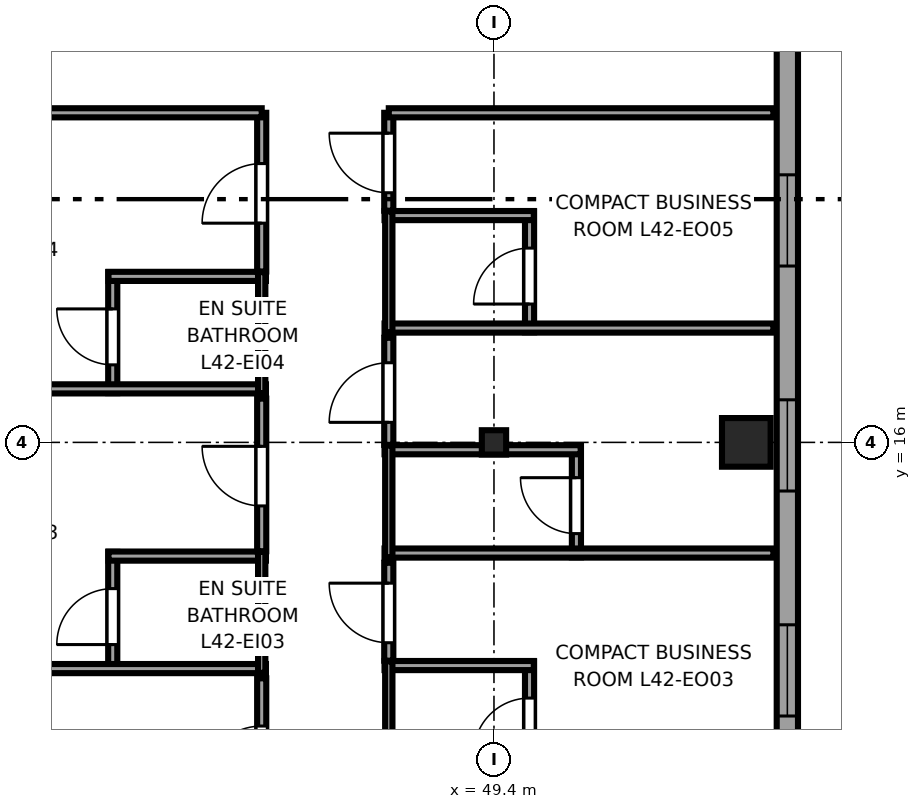
"""IFC4 building model, lengths in metres.
Left out: names, types, materials, properties, quantities, classifications, styles, units other than length and angle.
Written with IfcOpenShell. Run it as: python <this file> out.ifc"""

import sys

from ifc_helpers import new_model, si_unit, direction, frame, frame_2d, origin, origin_2d, place, context, subcontext, project, spatial, rectangle, i_section, extrude, source, transform, mapped, element, fill, save


model = new_model("IFC4")
c1 = context("Model", 3, precision=1e-05, world=origin(), true_north=direction((0.0, 1.0)))
c2 = subcontext(c1, "Body", "Model", "MODEL_VIEW")
j1 = project(units=[si_unit("LENGTHUNIT", "METRE"), si_unit("PLANEANGLEUNIT", "RADIAN")], contexts=[c1])
p1 = place(None, origin())
s1 = spatial("IfcSite", under=j1, at=p1, CompositionType="ELEMENT")
p2 = place(p1, origin())
s2 = spatial("IfcBuilding", under=s1, at=p2, CompositionType="ELEMENT")
p3 = place(p2, frame((0.0, 0.0, 161.25)))
s3 = spatial("IfcBuildingStorey", under=s2, at=p3, CompositionType="ELEMENT", Elevation=161.25)
m1 = source(origin(), c2, "Body", "SweptSolid", [
    extrude(i_section(OverallWidth=0.4, OverallDepth=0.4, WebThickness=0.02, FlangeThickness=0.035, at=origin_2d()), origin(), (0.0, 0.0, 1.0), 3.55),
])
p4 = place(p3, frame((49.4, 16.0, 0.0), z_axis=(0.0, 0.0, 1.0), x_axis=(1.0, 0.0, 0.0)))
e1 = element("IfcColumn", 1, at=p4, inside=s3, PredefinedType="COLUMN", context=c2, shape_type="MappedRepresentation", body=[
    mapped(m1, transform((0.0, 0.0, 0.0), x_axis=(1.0, 0.0, 0.0), y_axis=(0.0, 1.0, 0.0), z_axis=(0.0, 0.0, 1.0), scale=1.0)),
])
m2 = source(origin(), c2, "Body", "SweptSolid", [
    extrude(rectangle(XDim=0.8, YDim=0.8, at=origin_2d()), origin(), (0.0, 0.0, 1.0), 3.55),
])
p5 = place(p3, frame((53.55, 16.0, 0.0), z_axis=(0.0, 0.0, 1.0), x_axis=(1.0, 0.0, 0.0)))
e2 = element("IfcColumn", 2, at=p5, inside=s3, PredefinedType="COLUMN", context=c2, shape_type="MappedRepresentation", body=[
    mapped(m2, transform((0.0, 0.0, 0.0), x_axis=(1.0, 0.0, 0.0), y_axis=(0.0, 1.0, 0.0), z_axis=(0.0, 0.0, 1.0), scale=1.0)),
])
p6 = place(p3, frame((54.225, 7.017, 0.0), z_axis=(0.0, 0.0, 1.0), x_axis=(0.0, 1.0, 0.0)))
e3 = element("IfcWall", 3, at=p6, inside=s3, PredefinedType="SOLIDWALL", context=c2, shape_type="SweptSolid", body=[
    extrude(rectangle(XDim=34.566, YDim=0.35, at=frame_2d((17.283, 0.0))), origin(), (0.0, 0.0, 1.0), 3.37),
])
p7 = place(p6, frame((18.093, 0.0, 0.68)))
e4 = element("IfcOpeningElement", 4, at=p7, cuts=e3, PredefinedType="OPENING", context=c2, shape_type="SweptSolid", body=[
    extrude(rectangle(XDim=2.55, YDim=1.92, at=frame_2d((1.275, 0.96))), frame((0.0, 0.185, 0.0), z_axis=(0.0, -1.0, 0.0), x_axis=(1.0, 0.0, 0.0)), (0.0, 0.0, 1.0), 0.37),
])
p8 = place(p6, frame((0.986, 0.0, 0.62)))
e5 = element("IfcOpeningElement", 5, at=p8, cuts=e3, PredefinedType="OPENING", context=c2, shape_type="SweptSolid", body=[
    extrude(rectangle(XDim=1.5, YDim=1.55, at=frame_2d((0.75, 0.775))), frame((0.0, 0.185, 0.0), z_axis=(0.0, -1.0, 0.0), x_axis=(1.0, 0.0, 0.0)), (0.0, 0.0, 1.0), 0.37),
])
p9 = place(p6, frame((4.483, 0.0, 0.62)))
e6 = element("IfcOpeningElement", 6, at=p9, cuts=e3, PredefinedType="OPENING", context=c2, shape_type="SweptSolid", body=[
    extrude(rectangle(XDim=1.5, YDim=1.55, at=frame_2d((0.75, 0.775))), frame((0.0, 0.185, 0.0), z_axis=(0.0, -1.0, 0.0), x_axis=(1.0, 0.0, 0.0)), (0.0, 0.0, 1.0), 0.37),
])
p10 = place(p6, frame((8.183, 0.0, 0.62)))
e7 = element("IfcOpeningElement", 7, at=p10, cuts=e3, PredefinedType="OPENING", context=c2, shape_type="SweptSolid", body=[
    extrude(rectangle(XDim=1.5, YDim=1.55, at=frame_2d((0.75, 0.775))), frame((0.0, 0.185, 0.0), z_axis=(0.0, -1.0, 0.0), x_axis=(1.0, 0.0, 0.0)), (0.0, 0.0, 1.0), 0.37),
])
p11 = place(p6, frame((11.883, 0.0, 0.62)))
e8 = element("IfcOpeningElement", 8, at=p11, cuts=e3, PredefinedType="OPENING", context=c2, shape_type="SweptSolid", body=[
    extrude(rectangle(XDim=1.5, YDim=1.55, at=frame_2d((0.75, 0.775))), frame((0.0, 0.185, 0.0), z_axis=(0.0, -1.0, 0.0), x_axis=(1.0, 0.0, 0.0)), (0.0, 0.0, 1.0), 0.37),
])
p12 = place(p6, frame((27.768, 0.0, 0.62)))
e9 = element("IfcOpeningElement", 9, at=p12, cuts=e3, PredefinedType="OPENING", context=c2, shape_type="SweptSolid", body=[
    extrude(rectangle(XDim=1.5, YDim=1.55, at=frame_2d((0.75, 0.775))), frame((0.0, 0.185, 0.0), z_axis=(0.0, -1.0, 0.0), x_axis=(1.0, 0.0, 0.0)), (0.0, 0.0, 1.0), 0.37),
])
p13 = place(p3, frame((43.13, 12.21, 0.0), z_axis=(0.0, 0.0, 1.0), x_axis=(0.0, 1.0, 0.0)))
e10 = element("IfcWall", 10, at=p13, inside=s3, PredefinedType="PARTITIONING", context=c2, shape_type="SweptSolid", body=[
    extrude(rectangle(XDim=1.99, YDim=0.15, at=frame_2d((0.995, 0.0))), origin(), (0.0, 0.0, 1.0), 3.37),
])
p14 = place(p13, frame((0.465, 0.0, 0.0)))
e11 = element("IfcOpeningElement", 11, at=p14, cuts=e10, PredefinedType="OPENING", context=c2, shape_type="SweptSolid", body=[
    extrude(rectangle(XDim=0.92, YDim=2.01, at=frame_2d((0.46, 1.005))), frame((0.0, 0.085, 0.0), z_axis=(0.0, -1.0, 0.0), x_axis=(1.0, 0.0, 0.0)), (0.0, 0.0, 1.0), 0.17),
])
p15 = place(p3, frame((34.65, 12.28, 0.0), z_axis=(0.0, 0.0, 1.0), x_axis=(1.0, 0.0, 0.0)))
e12 = element("IfcWall", 12, at=p15, inside=s3, PredefinedType="PARTITIONING", context=c2, shape_type="SweptSolid", body=[
    extrude(rectangle(XDim=11.0, YDim=0.15, at=frame_2d((5.5, 0.0))), origin(), (0.0, 0.0, 1.0), 3.37),
])
p16 = place(p3, frame((43.06, 14.13, 0.0), z_axis=(0.0, 0.0, 1.0), x_axis=(1.0, 0.0, 0.0)))
e13 = element("IfcWall", 13, at=p16, inside=s3, PredefinedType="PARTITIONING", context=c2, shape_type="SweptSolid", body=[
    extrude(rectangle(XDim=2.59, YDim=0.15, at=frame_2d((1.295, 0.0))), origin(), (0.0, 0.0, 1.0), 3.37),
])
p17 = place(p3, frame((45.58, 12.21, 0.0), z_axis=(0.0, 0.0, 1.0), x_axis=(0.0, 1.0, 0.0)))
e14 = element("IfcWall", 14, at=p17, inside=s3, PredefinedType="PLUMBINGWALL", context=c2, shape_type="SweptSolid", body=[
    extrude(rectangle(XDim=1.99, YDim=0.12, at=frame_2d((0.995, 0.0))), origin(), (0.0, 0.0, 1.0), 3.001),
])
p18 = place(p3, frame((43.13, 16.81, 0.0), z_axis=(0.0, 0.0, 1.0), x_axis=(0.0, 1.0, 0.0)))
e15 = element("IfcWall", 15, at=p18, inside=s3, PredefinedType="PARTITIONING", context=c2, shape_type="SweptSolid", body=[
    extrude(rectangle(XDim=1.99, YDim=0.15, at=frame_2d((0.995, 0.0))), origin(), (0.0, 0.0, 1.0), 3.37),
])
p19 = place(p18, frame((0.465, 0.0, 0.0)))
e16 = element("IfcOpeningElement", 16, at=p19, cuts=e15, PredefinedType="OPENING", context=c2, shape_type="SweptSolid", body=[
    extrude(rectangle(XDim=0.92, YDim=2.01, at=frame_2d((0.46, 1.005))), frame((0.0, 0.085, 0.0), z_axis=(0.0, -1.0, 0.0), x_axis=(1.0, 0.0, 0.0)), (0.0, 0.0, 1.0), 0.17),
])
p20 = place(p3, frame((34.65, 16.88, 0.0), z_axis=(0.0, 0.0, 1.0), x_axis=(1.0, 0.0, 0.0)))
e17 = element("IfcWall", 17, at=p20, inside=s3, PredefinedType="PARTITIONING", context=c2, shape_type="SweptSolid", body=[
    extrude(rectangle(XDim=11.0, YDim=0.15, at=frame_2d((5.5, 0.0))), origin(), (0.0, 0.0, 1.0), 3.37),
])
p21 = place(p3, frame((43.06, 18.73, 0.0), z_axis=(0.0, 0.0, 1.0), x_axis=(1.0, 0.0, 0.0)))
e18 = element("IfcWall", 18, at=p21, inside=s3, PredefinedType="PARTITIONING", context=c2, shape_type="SweptSolid", body=[
    extrude(rectangle(XDim=2.59, YDim=0.15, at=frame_2d((1.295, 0.0))), origin(), (0.0, 0.0, 1.0), 3.37),
])
p22 = place(p3, frame((45.58, 16.81, 0.0), z_axis=(0.0, 0.0, 1.0), x_axis=(0.0, 1.0, 0.0)))
e19 = element("IfcWall", 19, at=p22, inside=s3, PredefinedType="PLUMBINGWALL", context=c2, shape_type="SweptSolid", body=[
    extrude(rectangle(XDim=1.99, YDim=0.12, at=frame_2d((0.995, 0.0))), origin(), (0.0, 0.0, 1.0), 3.001),
])
p23 = place(p3, frame((49.985, 10.41, 0.0), z_axis=(0.0, 0.0, 1.0), x_axis=(0.0, 1.0, 0.0)))
e20 = element("IfcWall", 20, at=p23, inside=s3, PredefinedType="PARTITIONING", context=c2, shape_type="SweptSolid", body=[
    extrude(rectangle(XDim=1.99, YDim=0.15, at=frame_2d((0.995, 0.0))), origin(), (0.0, 0.0, 1.0), 3.37),
])
p24 = place(p23, frame((0.465, 0.0, 0.0)))
e21 = element("IfcOpeningElement", 21, at=p24, cuts=e20, PredefinedType="OPENING", context=c2, shape_type="SweptSolid", body=[
    extrude(rectangle(XDim=0.92, YDim=2.01, at=frame_2d((0.46, 1.005))), frame((0.0, 0.085, 0.0), z_axis=(0.0, -1.0, 0.0), x_axis=(1.0, 0.0, 0.0)), (0.0, 0.0, 1.0), 0.17),
])
p25 = place(p3, frame((47.6, 12.33, 0.0), z_axis=(0.0, 0.0, 1.0), x_axis=(1.0, 0.0, 0.0)))
e22 = element("IfcWall", 22, at=p25, inside=s3, PredefinedType="PARTITIONING", context=c2, shape_type="SweptSolid", body=[
    extrude(rectangle(XDim=2.455, YDim=0.15, at=frame_2d((1.228, 0.0))), origin(), (0.0, 0.0, 1.0), 3.37),
])
p26 = place(p3, frame((47.67, 10.41, 0.0), z_axis=(0.0, 0.0, 1.0), x_axis=(0.0, 1.0, 0.0)))
e23 = element("IfcWall", 23, at=p26, inside=s3, PredefinedType="PLUMBINGWALL", context=c2, shape_type="SweptSolid", body=[
    extrude(rectangle(XDim=1.99, YDim=0.12, at=frame_2d((0.995, 0.0))), origin(), (0.0, 0.0, 1.0), 3.37),
])
p27 = place(p3, frame((50.756, 14.11, 0.0), z_axis=(0.0, 0.0, 1.0), x_axis=(0.0, 1.0, 0.0)))
e24 = element("IfcWall", 24, at=p27, inside=s3, PredefinedType="PARTITIONING", context=c2, shape_type="SweptSolid", body=[
    extrude(rectangle(XDim=1.839, YDim=0.15, at=frame_2d((0.919, 0.0))), origin(), (0.0, 0.0, 1.0), 3.37),
])
p28 = place(p27, frame((0.389, 0.0, 0.0)))
e25 = element("IfcOpeningElement", 25, at=p28, cuts=e24, PredefinedType="OPENING", context=c2, shape_type="SweptSolid", body=[
    extrude(rectangle(XDim=0.92, YDim=2.01, at=frame_2d((0.46, 1.005))), frame((0.0, 0.085, 0.0), z_axis=(0.0, -1.0, 0.0), x_axis=(1.0, 0.0, 0.0)), (0.0, 0.0, 1.0), 0.17),
])
p29 = place(p3, frame((47.6, 14.18, 0.0), z_axis=(0.0, 0.0, 1.0), x_axis=(1.0, 0.0, 0.0)))
e26 = element("IfcWall", 26, at=p29, inside=s3, PredefinedType="PARTITIONING", context=c2, shape_type="SweptSolid", body=[
    extrude(rectangle(XDim=6.395, YDim=0.15, at=frame_2d((3.198, 0.0))), origin(), (0.0, 0.0, 1.0), 3.37),
])
p30 = place(p3, frame((47.6, 15.879, 0.0), z_axis=(0.0, 0.0, 1.0), x_axis=(1.0, 0.0, 0.0)))
e27 = element("IfcWall", 27, at=p30, inside=s3, PredefinedType="PARTITIONING", context=c2, shape_type="SweptSolid", body=[
    extrude(rectangle(XDim=3.226, YDim=0.15, at=frame_2d((1.613, 0.0))), origin(), (0.0, 0.0, 1.0), 2.758),
])
p31 = place(p3, frame((47.67, 14.11, 0.0), z_axis=(0.0, 0.0, 1.0), x_axis=(0.0, 1.0, 0.0)))
e28 = element("IfcWall", 28, at=p31, inside=s3, PredefinedType="PLUMBINGWALL", context=c2, shape_type="SweptSolid", body=[
    extrude(rectangle(XDim=1.839, YDim=0.12, at=frame_2d((0.919, 0.0))), origin(), (0.0, 0.0, 1.0), 3.37),
])
p32 = place(p3, frame((49.985, 17.81, 0.0), z_axis=(0.0, 0.0, 1.0), x_axis=(0.0, 1.0, 0.0)))
e29 = element("IfcWall", 29, at=p32, inside=s3, PredefinedType="PARTITIONING", context=c2, shape_type="SweptSolid", body=[
    extrude(rectangle(XDim=1.99, YDim=0.15, at=frame_2d((0.995, 0.0))), origin(), (0.0, 0.0, 1.0), 3.37),
])
p33 = place(p32, frame((0.465, 0.0, 0.0)))
e30 = element("IfcOpeningElement", 30, at=p33, cuts=e29, PredefinedType="OPENING", context=c2, shape_type="SweptSolid", body=[
    extrude(rectangle(XDim=0.92, YDim=2.01, at=frame_2d((0.46, 1.005))), frame((0.0, 0.085, 0.0), z_axis=(0.0, -1.0, 0.0), x_axis=(1.0, 0.0, 0.0)), (0.0, 0.0, 1.0), 0.17),
])
p34 = place(p3, frame((47.6, 17.88, 0.0), z_axis=(0.0, 0.0, 1.0), x_axis=(1.0, 0.0, 0.0)))
e31 = element("IfcWall", 31, at=p34, inside=s3, PredefinedType="PARTITIONING", context=c2, shape_type="SweptSolid", body=[
    extrude(rectangle(XDim=6.395, YDim=0.15, at=frame_2d((3.198, 0.0))), origin(), (0.0, 0.0, 1.0), 3.37),
])
p35 = place(p3, frame((47.6, 19.73, 0.0), z_axis=(0.0, 0.0, 1.0), x_axis=(1.0, 0.0, 0.0)))
e32 = element("IfcWall", 32, at=p35, inside=s3, PredefinedType="PARTITIONING", context=c2, shape_type="SweptSolid", body=[
    extrude(rectangle(XDim=2.455, YDim=0.15, at=frame_2d((1.228, 0.0))), origin(), (0.0, 0.0, 1.0), 3.37),
])
p36 = place(p3, frame((47.67, 17.81, 0.0), z_axis=(0.0, 0.0, 1.0), x_axis=(0.0, 1.0, 0.0)))
e33 = element("IfcWall", 33, at=p36, inside=s3, PredefinedType="PLUMBINGWALL", context=c2, shape_type="SweptSolid", body=[
    extrude(rectangle(XDim=1.99, YDim=0.12, at=frame_2d((0.995, 0.0))), origin(), (0.0, 0.0, 1.0), 3.37),
])
p37 = place(p3, frame((45.58, 9.61, 0.0), z_axis=(0.0, 0.0, 1.0), x_axis=(0.0, 1.0, 0.0)))
e34 = element("IfcWall", 34, at=p37, inside=s3, PredefinedType="PARTITIONING", context=c2, shape_type="SweptSolid", body=[
    extrude(rectangle(XDim=2.51, YDim=0.15, at=frame_2d((1.255, 0.0))), origin(), (0.0, 0.0, 1.0), 3.001),
])
p38 = place(p37, frame((0.745, 0.0, 0.0)))
e35 = element("IfcOpeningElement", 35, at=p38, cuts=e34, PredefinedType="OPENING", context=c2, shape_type="SweptSolid", body=[
    extrude(rectangle(XDim=0.98, YDim=2.12, at=frame_2d((0.49, 1.06))), frame((0.0, 0.085, 0.0), z_axis=(0.0, -1.0, 0.0), x_axis=(1.0, 0.0, 0.0)), (0.0, 0.0, 1.0), 0.17),
])
p39 = place(p3, frame((45.58, 14.21, 0.0), z_axis=(0.0, 0.0, 1.0), x_axis=(0.0, 1.0, 0.0)))
e36 = element("IfcWall", 36, at=p39, inside=s3, PredefinedType="PARTITIONING", context=c2, shape_type="SweptSolid", body=[
    extrude(rectangle(XDim=2.51, YDim=0.15, at=frame_2d((1.255, 0.0))), origin(), (0.0, 0.0, 1.0), 3.001),
])
p40 = place(p39, frame((0.745, 0.0, 0.0)))
e37 = element("IfcOpeningElement", 37, at=p40, cuts=e36, PredefinedType="OPENING", context=c2, shape_type="SweptSolid", body=[
    extrude(rectangle(XDim=0.98, YDim=2.12, at=frame_2d((0.49, 1.06))), frame((0.0, 0.085, 0.0), z_axis=(0.0, -1.0, 0.0), x_axis=(1.0, 0.0, 0.0)), (0.0, 0.0, 1.0), 0.17),
])
p41 = place(p3, frame((45.58, 18.81, 0.0), z_axis=(0.0, 0.0, 1.0), x_axis=(0.0, 1.0, 0.0)))
e38 = element("IfcWall", 38, at=p41, inside=s3, PredefinedType="PARTITIONING", context=c2, shape_type="SweptSolid", body=[
    extrude(rectangle(XDim=2.61, YDim=0.15, at=frame_2d((1.305, 0.0))), origin(), (0.0, 0.0, 1.0), 3.001),
])
p42 = place(p41, frame((0.795, 0.0, 0.0)))
e39 = element("IfcOpeningElement", 39, at=p42, cuts=e38, PredefinedType="OPENING", context=c2, shape_type="SweptSolid", body=[
    extrude(rectangle(XDim=0.98, YDim=2.12, at=frame_2d((0.49, 1.06))), frame((0.0, 0.085, 0.0), z_axis=(0.0, -1.0, 0.0), x_axis=(1.0, 0.0, 0.0)), (0.0, 0.0, 1.0), 0.17),
])
p43 = place(p3, frame((34.65, 21.42, 0.0), z_axis=(0.0, 0.0, 1.0), x_axis=(1.0, 0.0, 0.0)))
e40 = element("IfcWall", 40, at=p43, inside=s3, PredefinedType="PARTITIONING", context=c2, shape_type="SweptSolid", body=[
    extrude(rectangle(XDim=10.93, YDim=0.15, at=frame_2d((5.465, 0.0))), origin(), (0.0, 0.0, 1.0), 3.37),
])
p44 = place(p3, frame((47.67, 12.41, 0.0), z_axis=(0.0, 0.0, 1.0), x_axis=(0.0, 1.0, 0.0)))
e41 = element("IfcWall", 41, at=p44, inside=s3, PredefinedType="PARTITIONING", context=c2, shape_type="SweptSolid", body=[
    extrude(rectangle(XDim=1.61, YDim=0.15, at=frame_2d((0.805, 0.0))), origin(), (0.0, 0.0, 1.0), 3.37),
])
p45 = place(p44, frame((0.295, 0.0, 0.0)))
e42 = element("IfcOpeningElement", 42, at=p45, cuts=e41, PredefinedType="OPENING", context=c2, shape_type="SweptSolid", body=[
    extrude(rectangle(XDim=0.98, YDim=2.12, at=frame_2d((0.49, 1.06))), frame((0.0, 0.085, 0.0), z_axis=(0.0, -1.0, 0.0), x_axis=(1.0, 0.0, 0.0)), (0.0, 0.0, 1.0), 0.17),
])
p46 = place(p3, frame((47.67, 15.959, 0.0), z_axis=(0.0, 0.0, 1.0), x_axis=(0.0, 1.0, 0.0)))
e43 = element("IfcWall", 43, at=p46, inside=s3, PredefinedType="PARTITIONING", context=c2, shape_type="SweptSolid", body=[
    extrude(rectangle(XDim=1.761, YDim=0.15, at=frame_2d((0.88, 0.0))), origin(), (0.0, 0.0, 1.0), 3.37),
])
p47 = place(p46, frame((0.371, 0.0, 0.0)))
e44 = element("IfcOpeningElement", 44, at=p47, cuts=e43, PredefinedType="OPENING", context=c2, shape_type="SweptSolid", body=[
    extrude(rectangle(XDim=0.98, YDim=2.12, at=frame_2d((0.49, 1.06))), frame((0.0, 0.085, 0.0), z_axis=(0.0, -1.0, 0.0), x_axis=(1.0, 0.0, 0.0)), (0.0, 0.0, 1.0), 0.17),
])
p48 = place(p3, frame((47.67, 19.81, 0.0), z_axis=(0.0, 0.0, 1.0), x_axis=(0.0, 1.0, 0.0)))
e45 = element("IfcWall", 45, at=p48, inside=s3, PredefinedType="PARTITIONING", context=c2, shape_type="SweptSolid", body=[
    extrude(rectangle(XDim=1.61, YDim=0.15, at=frame_2d((0.805, 0.0))), origin(), (0.0, 0.0, 1.0), 3.37),
])
p49 = place(p48, frame((0.295, 0.0, 0.0)))
e46 = element("IfcOpeningElement", 46, at=p49, cuts=e45, PredefinedType="OPENING", context=c2, shape_type="SweptSolid", body=[
    extrude(rectangle(XDim=0.98, YDim=2.12, at=frame_2d((0.49, 1.06))), frame((0.0, 0.085, 0.0), z_axis=(0.0, -1.0, 0.0), x_axis=(1.0, 0.0, 0.0)), (0.0, 0.0, 1.0), 0.17),
])
p50 = place(p3, frame((47.67, 21.42, 0.0), z_axis=(0.0, 0.0, 1.0), x_axis=(1.0, 0.0, 0.0)))
e47 = element("IfcWall", 47, at=p50, inside=s3, PredefinedType="PARTITIONING", context=c2, shape_type="SweptSolid", body=[
    extrude(rectangle(XDim=6.325, YDim=0.15, at=frame_2d((3.163, 0.0))), origin(), (0.0, 0.0, 1.0), 3.37),
])
m3 = source(origin(), c2, "Body", "SweptSolid", [
    extrude(rectangle(XDim=1.5, YDim=1.55, at=frame_2d((0.75, 0.775))), frame((0.0, 0.09, 0.0), z_axis=(0.0, -1.0, 0.0), x_axis=(1.0, 0.0, 0.0)), (0.0, 0.0, 1.0), 0.06),
])
p51 = place(p9, origin())
e48 = element("IfcWindow", 48, at=p51, inside=s3, PartitioningType="SINGLE_PANEL", PredefinedType="WINDOW", context=c2, shape_type="MappedRepresentation", body=[
    mapped(m3, transform((0.0, 0.0, 0.0), x_axis=(1.0, 0.0, 0.0), y_axis=(0.0, 1.0, 0.0), z_axis=(0.0, 0.0, 1.0), scale=1.0)),
])
fill(e6, e48)
p52 = place(p10, origin())
e49 = element("IfcWindow", 49, at=p52, inside=s3, PartitioningType="SINGLE_PANEL", PredefinedType="WINDOW", context=c2, shape_type="MappedRepresentation", body=[
    mapped(m3, transform((0.0, 0.0, 0.0), x_axis=(1.0, 0.0, 0.0), y_axis=(0.0, 1.0, 0.0), z_axis=(0.0, 0.0, 1.0), scale=1.0)),
])
fill(e7, e49)
p53 = place(p11, origin())
e50 = element("IfcWindow", 50, at=p53, inside=s3, PartitioningType="SINGLE_PANEL", PredefinedType="WINDOW", context=c2, shape_type="MappedRepresentation", body=[
    mapped(m3, transform((0.0, 0.0, 0.0), x_axis=(1.0, 0.0, 0.0), y_axis=(0.0, 1.0, 0.0), z_axis=(0.0, 0.0, 1.0), scale=1.0)),
])
fill(e8, e50)
m4 = source(origin(), c2, "Body", "SweptSolid", [
    extrude(rectangle(XDim=0.92, YDim=2.01, at=frame_2d((0.46, 1.005))), frame((0.0, 0.025, 0.0), z_axis=(0.0, -1.0, 0.0), x_axis=(1.0, 0.0, 0.0)), (0.0, 0.0, 1.0), 0.05),
])
p54 = place(p14, origin())
e51 = element("IfcDoor", 51, at=p54, inside=s3, OperationType="SINGLE_SWING_LEFT", PredefinedType="DOOR", context=c2, shape_type="MappedRepresentation", body=[
    mapped(m4, transform((0.0, 0.0, 0.0), x_axis=(1.0, 0.0, 0.0), y_axis=(0.0, 1.0, 0.0), z_axis=(0.0, 0.0, 1.0), scale=1.0)),
])
fill(e11, e51)
p55 = place(p19, origin())
e52 = element("IfcDoor", 52, at=p55, inside=s3, OperationType="SINGLE_SWING_RIGHT", PredefinedType="DOOR", context=c2, shape_type="MappedRepresentation", body=[
    mapped(m4, transform((0.0, 0.0, 0.0), x_axis=(1.0, 0.0, 0.0), y_axis=(0.0, 1.0, 0.0), z_axis=(0.0, 0.0, 1.0), scale=1.0)),
])
fill(e16, e52)
p56 = place(p24, origin())
e53 = element("IfcDoor", 53, at=p56, inside=s3, OperationType="SINGLE_SWING_LEFT", PredefinedType="DOOR", context=c2, shape_type="MappedRepresentation", body=[
    mapped(m4, transform((0.0, 0.0, 0.0), x_axis=(1.0, 0.0, 0.0), y_axis=(0.0, 1.0, 0.0), z_axis=(0.0, 0.0, 1.0), scale=1.0)),
])
fill(e21, e53)
p57 = place(p28, origin())
e54 = element("IfcDoor", 54, at=p57, inside=s3, OperationType="SINGLE_SWING_RIGHT", PredefinedType="DOOR", context=c2, shape_type="MappedRepresentation", body=[
    mapped(m4, transform((0.0, 0.0, 0.0), x_axis=(1.0, 0.0, 0.0), y_axis=(0.0, 1.0, 0.0), z_axis=(0.0, 0.0, 1.0), scale=1.0)),
])
fill(e25, e54)
p58 = place(p33, origin())
e55 = element("IfcDoor", 55, at=p58, inside=s3, OperationType="SINGLE_SWING_LEFT", PredefinedType="DOOR", context=c2, shape_type="MappedRepresentation", body=[
    mapped(m4, transform((0.0, 0.0, 0.0), x_axis=(1.0, 0.0, 0.0), y_axis=(0.0, 1.0, 0.0), z_axis=(0.0, 0.0, 1.0), scale=1.0)),
])
fill(e30, e55)
m5 = source(origin(), c2, "Body", "SweptSolid", [
    extrude(rectangle(XDim=0.98, YDim=2.12, at=frame_2d((0.49, 1.06))), frame((0.0, 0.025, 0.0), z_axis=(0.0, -1.0, 0.0), x_axis=(1.0, 0.0, 0.0)), (0.0, 0.0, 1.0), 0.05),
])
p59 = place(p38, origin())
e56 = element("IfcDoor", 56, at=p59, inside=s3, OperationType="SINGLE_SWING_LEFT", PredefinedType="DOOR", context=c2, shape_type="MappedRepresentation", body=[
    mapped(m5, transform((0.0, 0.0, 0.0), x_axis=(1.0, 0.0, 0.0), y_axis=(0.0, 1.0, 0.0), z_axis=(0.0, 0.0, 1.0), scale=1.0)),
])
fill(e35, e56)
p60 = place(p40, origin())
e57 = element("IfcDoor", 57, at=p60, inside=s3, OperationType="SINGLE_SWING_RIGHT", PredefinedType="DOOR", context=c2, shape_type="MappedRepresentation", body=[
    mapped(m5, transform((0.0, 0.0, 0.0), x_axis=(1.0, 0.0, 0.0), y_axis=(0.0, 1.0, 0.0), z_axis=(0.0, 0.0, 1.0), scale=1.0)),
])
fill(e37, e57)
p61 = place(p42, origin())
e58 = element("IfcDoor", 58, at=p61, inside=s3, OperationType="SINGLE_SWING_LEFT", PredefinedType="DOOR", context=c2, shape_type="MappedRepresentation", body=[
    mapped(m5, transform((0.0, 0.0, 0.0), x_axis=(1.0, 0.0, 0.0), y_axis=(0.0, 1.0, 0.0), z_axis=(0.0, 0.0, 1.0), scale=1.0)),
])
fill(e39, e58)
p62 = place(p45, origin())
e59 = element("IfcDoor", 59, at=p62, inside=s3, OperationType="SINGLE_SWING_RIGHT", PredefinedType="DOOR", context=c2, shape_type="MappedRepresentation", body=[
    mapped(m5, transform((0.0, 0.0, 0.0), x_axis=(1.0, 0.0, 0.0), y_axis=(0.0, 1.0, 0.0), z_axis=(0.0, 0.0, 1.0), scale=1.0)),
])
fill(e42, e59)
p63 = place(p47, origin())
e60 = element("IfcDoor", 60, at=p63, inside=s3, OperationType="SINGLE_SWING_LEFT", PredefinedType="DOOR", context=c2, shape_type="MappedRepresentation", body=[
    mapped(m5, transform((0.0, 0.0, 0.0), x_axis=(1.0, 0.0, 0.0), y_axis=(0.0, 1.0, 0.0), z_axis=(0.0, 0.0, 1.0), scale=1.0)),
])
fill(e44, e60)
p64 = place(p49, origin())
e61 = element("IfcDoor", 61, at=p64, inside=s3, OperationType="SINGLE_SWING_RIGHT", PredefinedType="DOOR", context=c2, shape_type="MappedRepresentation", body=[
    mapped(m5, transform((0.0, 0.0, 0.0), x_axis=(1.0, 0.0, 0.0), y_axis=(0.0, 1.0, 0.0), z_axis=(0.0, 0.0, 1.0), scale=1.0)),
])
fill(e46, e61)
save(model, sys.argv[1])
